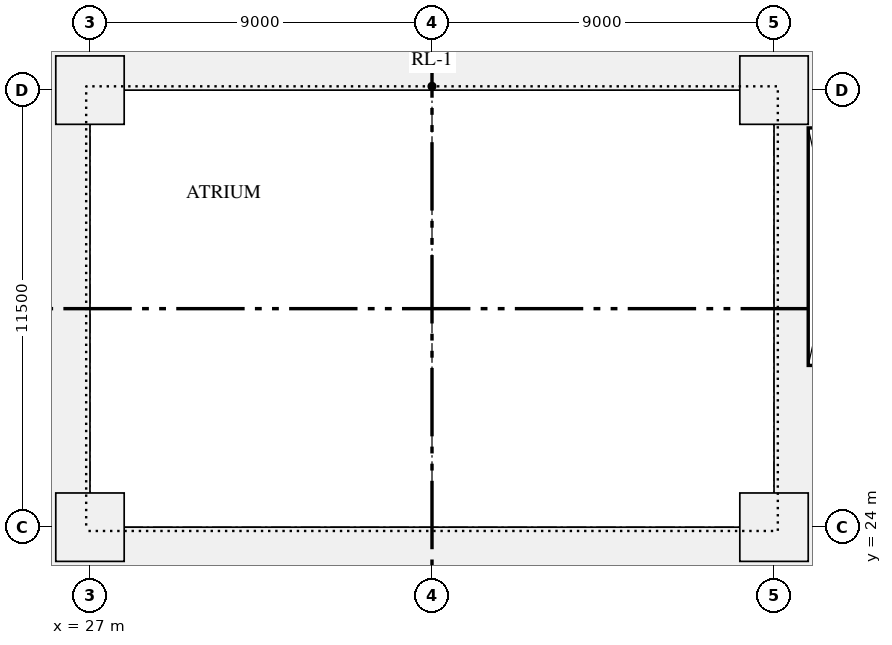
"""IFC4 building model, lengths in metres.
Left out: names, types, materials, properties, quantities, classifications, styles, units other than length and angle.
Written with IfcOpenShell. Run it as: python <this file> out.ifc"""

import sys

from ifc_helpers import new_model, si_unit, direction, frame, origin, origin_2d, place, context, subcontext, project, spatial, rectangle, extrude, element, save


model = new_model("IFC4")
c1 = context("Model", 3, precision=1e-05, world=origin(), true_north=direction((0.0, 1.0)))
c2 = subcontext(c1, "Body", "Model", "MODEL_VIEW")
j1 = project(units=[si_unit("LENGTHUNIT", "METRE"), si_unit("PLANEANGLEUNIT", "RADIAN")], contexts=[c1])
p1 = place(None, origin())
s1 = spatial("IfcSite", under=j1, at=p1, CompositionType="ELEMENT")
p2 = place(p1, origin())
s2 = spatial("IfcBuilding", under=s1, at=p2, CompositionType="ELEMENT")
p3 = place(p2, frame((0.0, 0.0, 6.5)))
s3 = spatial("IfcBuildingStorey", under=s2, at=p3, CompositionType="ELEMENT", Elevation=6.5)
for number, where, z_axis, x_axis in (
    (1, (27.0, 24.0, 0.0), (0.0, 0.0, 1.0), (1.0, 0.0, 0.0)),
    (2, (27.0, 35.5, 0.0), (0.0, 0.0, 1.0), (1.0, 0.0, 0.0)),
    (3, (45.0, 24.0, 0.0), (0.0, 0.0, 1.0), (1.0, 0.0, 0.0)),
    (4, (45.0, 35.5, 0.0), (0.0, 0.0, 1.0), (1.0, 0.0, 0.0)),
):
    element("IfcColumn", number, at=place(p3, frame(where, z_axis=z_axis, x_axis=x_axis)), inside=s3, PredefinedType="COLUMN", context=c2, shape_type="SweptSolid", body=[
        extrude(rectangle(XDim=1.8, YDim=1.8, at=origin_2d()), origin(), (0.0, 0.0, 1.0), 4.5),
    ])
save(model, sys.argv[1])
